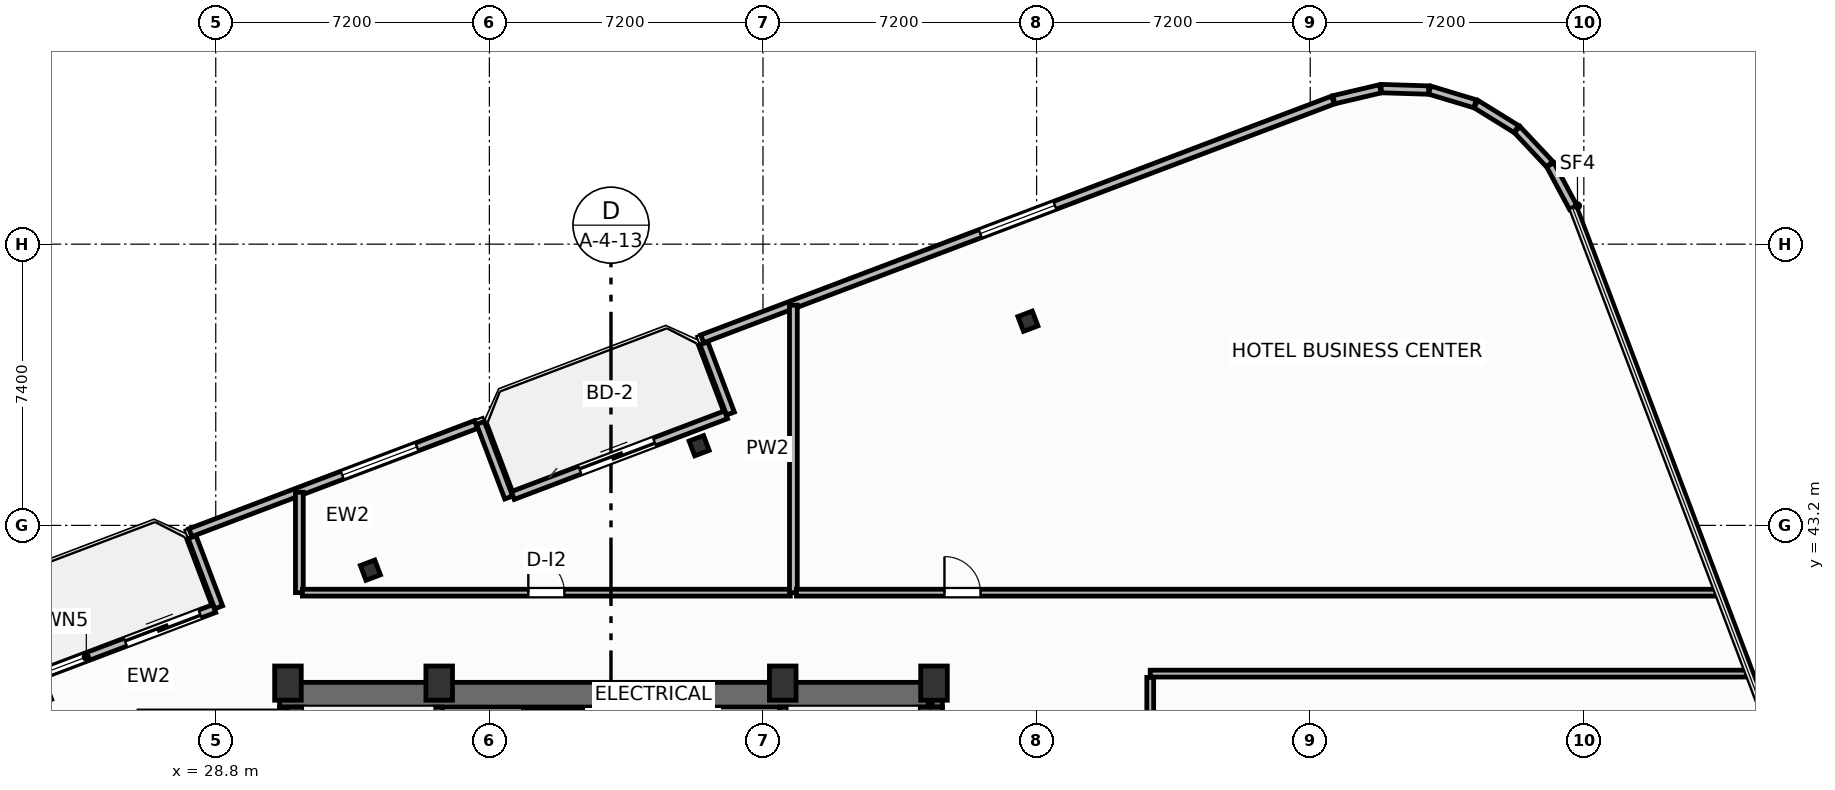
"""IFC4 building model, lengths in metres.
Left out: names, types, materials, properties, quantities, classifications, styles, units other than length and angle.
Written with IfcOpenShell. Run it as: python <this file> out.ifc"""

import sys

from ifc_helpers import new_model, si_unit, direction, frame, frame_2d, origin, origin_2d, place, context, subcontext, project, spatial, rectangle, i_section, extrude, element, fill, save


model = new_model("IFC4")
c1 = context("Model", 3, precision=1e-05, world=origin(), true_north=direction((0.0, 1.0)))
c2 = subcontext(c1, "Body", "Model", "MODEL_VIEW")
j1 = project(units=[si_unit("LENGTHUNIT", "METRE"), si_unit("PLANEANGLEUNIT", "RADIAN")], contexts=[c1])
p1 = place(None, origin())
s1 = spatial("IfcSite", under=j1, at=p1, CompositionType="ELEMENT")
p2 = place(p1, origin())
s2 = spatial("IfcBuilding", under=s1, at=p2, CompositionType="ELEMENT")
p3 = place(p2, frame((0.0, 0.0, 223.8)))
s3 = spatial("IfcBuildingStorey", under=s2, at=p3, CompositionType="ELEMENT", Elevation=223.8)
for number, where, z_axis, x_axis in (
    (1, (30.7, 39.05, 0.0), (0.0, 0.0, 1.0), (1.0, 0.0, 0.0)),
    (2, (34.68, 39.05, 0.0), (0.0, 0.0, 1.0), (1.0, 0.0, 0.0)),
    (3, (43.72, 39.05, 0.0), (0.0, 0.0, 1.0), (1.0, 0.0, 0.0)),
    (4, (47.7, 39.05, 0.0), (0.0, 0.0, 1.0), (1.0, 0.0, 0.0)),
):
    element("IfcColumn", number, at=place(p3, frame(where, z_axis=z_axis, x_axis=x_axis)), inside=s3, PredefinedType="COLUMN", context=c2, shape_type="SweptSolid", body=[
        extrude(rectangle(XDim=0.7, YDim=0.9, at=origin_2d()), origin(), (0.0, 0.0, 1.0), 3.7),
    ])
p4 = place(p3, frame((30.48, 38.745, 0.0), z_axis=(0.0, 0.0, 1.0), x_axis=(1.0, 0.0, 0.0)))
e5 = element("IfcWall", 5, at=p4, inside=s3, PredefinedType="SHEAR", context=c2, shape_type="SweptSolid", body=[
    extrude(rectangle(XDim=17.44, YDim=0.65, at=frame_2d((8.72, 0.0))), origin(), (0.0, 0.0, 1.0), 3.45),
])
for number, where, z_axis, x_axis in (
    (6, (30.805, 29.2, 0.0), (0.0, 0.0, 1.0), (0.0, 1.0, 0.0)),
    (7, (47.595, 29.2, 0.0), (0.0, 0.0, 1.0), (0.0, 1.0, 0.0)),
):
    element("IfcWall", number, at=place(p3, frame(where, z_axis=z_axis, x_axis=x_axis)), inside=s3, PredefinedType="SHEAR", context=c2, shape_type="SweptSolid", body=[
        extrude(rectangle(XDim=9.22, YDim=0.65, at=frame_2d((4.61, 0.0))), origin(), (0.0, 0.0, 1.0), 3.45),
    ])
p5 = place(p3, frame((34.64, 29.2, 0.0), z_axis=(0.0, 0.0, 1.0), x_axis=(0.0, 1.0, 0.0)))
e8 = element("IfcWall", 8, at=p5, inside=s3, PredefinedType="SHEAR", context=c2, shape_type="SweptSolid", body=[
    extrude(rectangle(XDim=9.22, YDim=0.25, at=frame_2d((4.61, 0.0))), origin(), (0.0, 0.0, 1.0), 3.45),
])
p6 = place(p5, frame((0.65, 0.0, 0.0)))
e9 = element("IfcOpeningElement", 9, at=p6, cuts=e8, PredefinedType="OPENING", context=c2, shape_type="SweptSolid", body=[
    extrude(rectangle(XDim=1.05, YDim=2.15, at=frame_2d((0.525, 1.075))), frame((0.0, 0.135, 0.0), z_axis=(0.0, -1.0, 0.0), x_axis=(1.0, 0.0, 0.0)), (0.0, 0.0, 1.0), 0.27),
])
p7 = place(p3, frame((43.76, 29.2, 0.0), z_axis=(0.0, 0.0, 1.0), x_axis=(0.0, 1.0, 0.0)))
e10 = element("IfcWall", 10, at=p7, inside=s3, PredefinedType="SHEAR", context=c2, shape_type="SweptSolid", body=[
    extrude(rectangle(XDim=9.22, YDim=0.25, at=frame_2d((4.61, 0.0))), origin(), (0.0, 0.0, 1.0), 3.45),
])
p8 = place(p7, frame((0.65, 0.0, 0.0)))
e11 = element("IfcOpeningElement", 11, at=p8, cuts=e10, PredefinedType="OPENING", context=c2, shape_type="SweptSolid", body=[
    extrude(rectangle(XDim=1.05, YDim=2.15, at=frame_2d((0.525, 1.075))), frame((0.0, 0.135, 0.0), z_axis=(0.0, -1.0, 0.0), x_axis=(1.0, 0.0, 0.0)), (0.0, 0.0, 1.0), 0.27),
])
for number, where, z_axis, x_axis in (
    (12, (50.171, 48.572, 0.0), (0.0, 0.0, 1.0), (0.935, 0.354, 0.0)),
    (13, (41.52, 45.297, 0.0), (0.0, 0.0, 1.0), (0.935, 0.354, 0.0)),
    (14, (32.869, 42.022, 0.0), (0.0, 0.0, 1.0), (0.935, 0.354, 0.0)),
):
    element("IfcColumn", number, at=place(p3, frame(where, z_axis=z_axis, x_axis=x_axis)), inside=s3, PredefinedType="COLUMN", context=c2, shape_type="SweptSolid", body=[
        extrude(i_section(OverallWidth=0.406, OverallDepth=0.416, WebThickness=0.03, FlangeThickness=0.048, FilletRadius=0.025, at=origin_2d()), origin(), (0.0, 0.0, 1.0), 3.7),
    ])
p9 = place(p3, frame((23.149, 38.887, 0.0), z_axis=(0.0, 0.0, 1.0), x_axis=(0.9352192676, 0.354069091436, 0.0)))
e15 = element("IfcWall", 15, at=p9, inside=s3, PredefinedType="SOLIDWALL", context=c2, shape_type="SweptSolid", body=[
    extrude(rectangle(XDim=6.0, YDim=0.22, at=frame_2d((3.0, 0.0))), origin(), (0.0, 0.0, 1.0), 2.73),
])
p10 = place(p9, frame((3.5, 0.0, 0.0)))
e16 = element("IfcOpeningElement", 16, at=p10, cuts=e15, PredefinedType="OPENING", context=c2, shape_type="SweptSolid", body=[
    extrude(rectangle(XDim=2.1, YDim=2.3, at=frame_2d((1.05, 1.15))), frame((0.0, 0.12, 0.0), z_axis=(0.0, -1.0, 0.0), x_axis=(1.0, 0.0, 0.0)), (0.0, 0.0, 1.0), 0.24),
])
p11 = place(p9, frame((0.55, 0.0, 0.75)))
e17 = element("IfcOpeningElement", 17, at=p11, cuts=e15, PredefinedType="OPENING", context=c2, shape_type="SweptSolid", body=[
    extrude(rectangle(XDim=1.85, YDim=1.75, at=frame_2d((0.925, 0.875))), frame((0.0, 0.12, 0.0), z_axis=(0.0, -1.0, 0.0), x_axis=(1.0, 0.0, 0.0)), (0.0, 0.0, 1.0), 0.24),
])
p12 = place(p3, frame((36.617, 43.986, 0.0), z_axis=(0.0, 0.0, 1.0), x_axis=(0.935227640088, 0.354046976001, 0.0)))
e18 = element("IfcWall", 18, at=p12, inside=s3, PredefinedType="SOLIDWALL", context=c2, shape_type="SweptSolid", body=[
    extrude(rectangle(XDim=6.0, YDim=0.22, at=frame_2d((3.0, 0.0))), origin(), (0.0, 0.0, 1.0), 2.73),
])
p13 = place(p12, frame((1.888, 0.0, 0.0)))
e19 = element("IfcOpeningElement", 19, at=p13, cuts=e18, PredefinedType="OPENING", context=c2, shape_type="SweptSolid", body=[
    extrude(rectangle(XDim=2.1, YDim=2.3, at=frame_2d((1.05, 1.15))), frame((0.0, 0.12, 0.0), z_axis=(0.0, -1.0, 0.0), x_axis=(1.0, 0.0, 0.0)), (0.0, 0.0, 1.0), 0.24),
])
p14 = place(p3, frame((64.519, 51.566, 0.0), z_axis=(0.0, 0.0, 1.0), x_axis=(-0.473093575122, 0.881012184466, 0.0)))
e20 = element("IfcWall", 20, at=p14, inside=s3, PredefinedType="SOLIDWALL", context=c2, shape_type="SweptSolid", body=[
    extrude(rectangle(XDim=1.274, YDim=0.22, at=frame_2d((0.637, 0.0))), origin(), (0.0, 0.0, 1.0), 2.73),
])
for number, where, z_axis, x_axis in (
    (21, (63.899, 52.706, 0.0), (0.0, 0.0, 1.0), (-0.685, 0.729, 0.0)),
    (22, (63.023, 53.629, 0.0), (0.0, 0.0, 1.0), (-0.85, 0.526, 0.0)),
):
    element("IfcWall", number, at=place(p3, frame(where, z_axis=z_axis, x_axis=x_axis)), inside=s3, PredefinedType="SOLIDWALL", context=c2, shape_type="SweptSolid", body=[
        extrude(rectangle(XDim=1.249, YDim=0.22, at=frame_2d((0.625, 0.0))), origin(), (0.0, 0.0, 1.0), 2.73),
    ])
for number, where, z_axis, x_axis in (
    (23, (61.937, 54.294, 0.0), (0.0, 0.0, 1.0), (-0.958, 0.288, 0.0)),
    (24, (60.717, 54.655, 0.0), (0.0, 0.0, 1.0), (-1.0, 0.031, 0.0)),
):
    element("IfcWall", number, at=place(p3, frame(where, z_axis=z_axis, x_axis=x_axis)), inside=s3, PredefinedType="SOLIDWALL", context=c2, shape_type="SweptSolid", body=[
        extrude(rectangle(XDim=1.249, YDim=0.22, at=frame_2d((0.624, 0.0))), origin(), (0.0, 0.0, 1.0), 2.73),
    ])
p15 = place(p3, frame((59.444, 54.688, 0.0), z_axis=(0.0, 0.0, 1.0), x_axis=(-0.973409523464, -0.229071821989, 0.0)))
e25 = element("IfcWall", 25, at=p15, inside=s3, PredefinedType="SOLIDWALL", context=c2, shape_type="SweptSolid", body=[
    extrude(rectangle(XDim=1.257, YDim=0.22, at=frame_2d((0.628, 0.0))), origin(), (0.0, 0.0, 1.0), 2.73),
])
p16 = place(p3, frame((58.198, 54.391, 0.0), z_axis=(0.0, 0.0, 1.0), x_axis=(-0.935223849772, -0.354056988094, 0.0)))
e26 = element("IfcWall", 26, at=p16, inside=s3, PredefinedType="SOLIDWALL", context=c2, shape_type="SweptSolid", body=[
    extrude(rectangle(XDim=17.747, YDim=0.22, at=frame_2d((8.874, 0.0))), origin(), (0.0, 0.0, 1.0), 2.73),
])
p17 = place(p16, frame((7.823, 0.0, 0.8)))
e27 = element("IfcOpeningElement", 27, at=p17, cuts=e26, PredefinedType="OPENING", context=c2, shape_type="SweptSolid", body=[
    extrude(rectangle(XDim=2.1, YDim=1.75, at=frame_2d((1.05, 0.875))), frame((0.0, 0.12, 0.0), z_axis=(0.0, -1.0, 0.0), x_axis=(1.0, 0.0, 0.0)), (0.0, 0.0, 1.0), 0.24),
])
p18 = place(p3, frame((41.645, 47.99, 0.0), z_axis=(0.0, 0.0, 1.0), x_axis=(0.354020680661, -0.935237594232, 0.0)))
e28 = element("IfcWall", 28, at=p18, inside=s3, PredefinedType="SOLIDWALL", context=c2, shape_type="SweptSolid", body=[
    extrude(rectangle(XDim=1.975, YDim=0.22, at=frame_2d((0.988, 0.0))), origin(), (0.0, 0.0, 1.0), 2.73),
])
p19 = place(p3, frame((36.508, 43.934, 0.0), z_axis=(0.0, 0.0, 1.0), x_axis=(-0.354128469405, 0.935196785258, 0.0)))
e29 = element("IfcWall", 29, at=p19, inside=s3, PredefinedType="SOLIDWALL", context=c2, shape_type="SweptSolid", body=[
    extrude(rectangle(XDim=2.1, YDim=0.22, at=frame_2d((1.05, 0.0))), origin(), (0.0, 0.0, 1.0), 2.73),
])
p20 = place(p3, frame((35.648, 45.854, 0.0), z_axis=(0.0, 0.0, 1.0), x_axis=(-0.935230796934, -0.354038636968, 0.0)))
e30 = element("IfcWall", 30, at=p20, inside=s3, PredefinedType="SOLIDWALL", context=c2, shape_type="SweptSolid", body=[
    extrude(rectangle(XDim=8.035, YDim=0.22, at=frame_2d((4.018, 0.0))), origin(), (0.0, 0.0, 1.0), 2.73),
])
p21 = place(p20, frame((1.662, 0.0, 0.8)))
e31 = element("IfcOpeningElement", 31, at=p21, cuts=e30, PredefinedType="OPENING", context=c2, shape_type="SweptSolid", body=[
    extrude(rectangle(XDim=2.1, YDim=1.75, at=frame_2d((1.05, 0.875))), frame((0.0, 0.12, 0.0), z_axis=(0.0, -1.0, 0.0), x_axis=(1.0, 0.0, 0.0)), (0.0, 0.0, 1.0), 0.24),
])
p22 = place(p3, frame((28.177, 42.892, 0.0), z_axis=(0.0, 0.0, 1.0), x_axis=(0.354061611705, -0.935222099352, 0.0)))
e32 = element("IfcWall", 32, at=p22, inside=s3, PredefinedType="SOLIDWALL", context=c2, shape_type="SweptSolid", body=[
    extrude(rectangle(XDim=1.975, YDim=0.22, at=frame_2d((0.987, 0.0))), origin(), (0.0, 0.0, 1.0), 2.73),
])
p23 = place(p3, frame((31.0, 41.43, 0.0), z_axis=(0.0, 0.0, 1.0), x_axis=(0.0, 1.0, 0.0)))
e33 = element("IfcWall", 33, at=p23, inside=s3, PredefinedType="PARTITIONING", context=c2, shape_type="SweptSolid", body=[
    extrude(rectangle(XDim=2.643, YDim=0.205, at=frame_2d((1.321, 0.0))), origin(), (0.0, 0.0, 1.0), 3.45),
])
p24 = place(p3, frame((31.08, 41.43, 0.0), z_axis=(0.0, 0.0, 1.0), x_axis=(1.0, 0.0, 0.0)))
e34 = element("IfcWall", 34, at=p24, inside=s3, PredefinedType="PARTITIONING", context=c2, shape_type="SweptSolid", body=[
    extrude(rectangle(XDim=12.84, YDim=0.18, at=frame_2d((6.42, 0.0))), origin(), (0.0, 0.0, 1.0), 3.018),
])
p25 = place(p24, frame((5.945, 0.0, 0.0)))
e35 = element("IfcOpeningElement", 35, at=p25, cuts=e34, PredefinedType="OPENING", context=c2, shape_type="SweptSolid", body=[
    extrude(rectangle(XDim=0.95, YDim=2.05, at=frame_2d((0.475, 1.025))), frame((0.0, 0.1, 0.0), z_axis=(0.0, -1.0, 0.0), x_axis=(1.0, 0.0, 0.0)), (0.0, 0.0, 1.0), 0.2),
])
p26 = place(p3, frame((44.0, 41.43, 0.0), z_axis=(0.0, 0.0, 1.0), x_axis=(0.0, 1.0, 0.0)))
e36 = element("IfcWall", 36, at=p26, inside=s3, PredefinedType="PARTITIONING", context=c2, shape_type="SweptSolid", body=[
    extrude(rectangle(XDim=7.564, YDim=0.205, at=frame_2d((3.782, 0.0))), origin(), (0.0, 0.0, 1.0), 3.45),
])
p27 = place(p3, frame((44.08, 41.43, 0.0), z_axis=(0.0, 0.0, 1.0), x_axis=(1.0, 0.0, 0.0)))
e37 = element("IfcWall", 37, at=p27, inside=s3, PredefinedType="PARTITIONING", context=c2, shape_type="SweptSolid", body=[
    extrude(rectangle(XDim=24.216, YDim=0.18, at=frame_2d((12.108, 0.0))), origin(), (0.0, 0.0, 1.0), 3.45),
])
p28 = place(p27, frame((3.895, 0.0, 0.0)))
e38 = element("IfcOpeningElement", 38, at=p28, cuts=e37, PredefinedType="OPENING", context=c2, shape_type="SweptSolid", body=[
    extrude(rectangle(XDim=0.95, YDim=2.05, at=frame_2d((0.475, 1.025))), frame((0.0, 0.1, 0.0), z_axis=(0.0, -1.0, 0.0), x_axis=(1.0, 0.0, 0.0)), (0.0, 0.0, 1.0), 0.2),
])
p29 = place(p3, frame((53.39, 27.53, 0.0), z_axis=(0.0, 0.0, 1.0), x_axis=(0.0, 1.0, 0.0)))
e39 = element("IfcWall", 39, at=p29, inside=s3, PredefinedType="PARTITIONING", context=c2, shape_type="SweptSolid", body=[
    extrude(rectangle(XDim=11.67, YDim=0.18, at=frame_2d((5.835, 0.0))), origin(), (0.0, 0.0, 1.0), 3.45),
])
p30 = place(p29, frame((5.8, 0.0, 0.0)))
e40 = element("IfcOpeningElement", 40, at=p30, cuts=e39, PredefinedType="OPENING", context=c2, shape_type="SweptSolid", body=[
    extrude(rectangle(XDim=0.92, YDim=2.05, at=frame_2d((0.46, 1.025))), frame((0.0, 0.1, 0.0), z_axis=(0.0, -1.0, 0.0), x_axis=(1.0, 0.0, 0.0)), (0.0, 0.0, 1.0), 0.2),
])
p31 = place(p3, frame((53.39, 39.3, 0.0), z_axis=(0.0, 0.0, 1.0), x_axis=(1.0, 0.0, 0.0)))
e41 = element("IfcWall", 41, at=p31, inside=s3, PredefinedType="PARTITIONING", context=c2, shape_type="SweptSolid", body=[
    extrude(rectangle(XDim=15.713, YDim=0.18, at=frame_2d((7.856, 0.0))), origin(), (0.0, 0.0, 1.0), 3.45),
])
p32 = place(p10, origin())
e42 = element("IfcDoor", 42, at=p32, inside=s3, OperationType="SLIDING_TO_LEFT", PredefinedType="DOOR", context=c2, shape_type="SweptSolid", body=[
    extrude(rectangle(XDim=2.1, YDim=2.3, at=frame_2d((1.05, 1.15))), frame((0.0, 0.025, 0.0), z_axis=(0.0, -1.0, 0.0), x_axis=(1.0, 0.0, 0.0)), (0.0, 0.0, 1.0), 0.05),
])
fill(e16, e42)
p33 = place(p11, origin())
e43 = element("IfcWindow", 43, at=p33, inside=s3, PartitioningType="SINGLE_PANEL", PredefinedType="WINDOW", context=c2, shape_type="SweptSolid", body=[
    extrude(rectangle(XDim=1.85, YDim=1.75, at=frame_2d((0.925, 0.875))), frame((0.0, 0.03, 0.0), z_axis=(0.0, -1.0, 0.0), x_axis=(1.0, 0.0, 0.0)), (0.0, 0.0, 1.0), 0.06),
])
fill(e17, e43)
p34 = place(p13, origin())
e44 = element("IfcDoor", 44, at=p34, inside=s3, OperationType="SLIDING_TO_LEFT", PredefinedType="DOOR", context=c2, shape_type="SweptSolid", body=[
    extrude(rectangle(XDim=2.1, YDim=2.3, at=frame_2d((1.05, 1.15))), frame((0.0, 0.025, 0.0), z_axis=(0.0, -1.0, 0.0), x_axis=(1.0, 0.0, 0.0)), (0.0, 0.0, 1.0), 0.05),
])
fill(e19, e44)
p35 = place(p17, origin())
e45 = element("IfcWindow", 45, at=p35, inside=s3, PartitioningType="SINGLE_PANEL", PredefinedType="WINDOW", context=c2, shape_type="SweptSolid", body=[
    extrude(rectangle(XDim=2.1, YDim=1.75, at=frame_2d((1.05, 0.875))), frame((0.0, 0.03, 0.0), z_axis=(0.0, -1.0, 0.0), x_axis=(1.0, 0.0, 0.0)), (0.0, 0.0, 1.0), 0.06),
])
fill(e27, e45)
p36 = place(p21, origin())
e46 = element("IfcWindow", 46, at=p36, inside=s3, PartitioningType="SINGLE_PANEL", PredefinedType="WINDOW", context=c2, shape_type="SweptSolid", body=[
    extrude(rectangle(XDim=2.1, YDim=1.75, at=frame_2d((1.05, 0.875))), frame((0.0, 0.03, 0.0), z_axis=(0.0, -1.0, 0.0), x_axis=(1.0, 0.0, 0.0)), (0.0, 0.0, 1.0), 0.06),
])
fill(e31, e46)
p37 = place(p25, origin())
e47 = element("IfcDoor", 47, at=p37, inside=s3, OperationType="SINGLE_SWING_LEFT", PredefinedType="DOOR", context=c2, shape_type="SweptSolid", body=[
    extrude(rectangle(XDim=0.95, YDim=2.05, at=frame_2d((0.475, 1.025))), frame((0.0, 0.025, 0.0), z_axis=(0.0, -1.0, 0.0), x_axis=(1.0, 0.0, 0.0)), (0.0, 0.0, 1.0), 0.05),
])
fill(e35, e47)
p38 = place(p28, origin())
e48 = element("IfcDoor", 48, at=p38, inside=s3, OperationType="SINGLE_SWING_LEFT", PredefinedType="DOOR", context=c2, shape_type="SweptSolid", body=[
    extrude(rectangle(XDim=0.95, YDim=2.05, at=frame_2d((0.475, 1.025))), frame((0.0, 0.025, 0.0), z_axis=(0.0, -1.0, 0.0), x_axis=(1.0, 0.0, 0.0)), (0.0, 0.0, 1.0), 0.05),
])
fill(e38, e48)
save(model, sys.argv[1])
